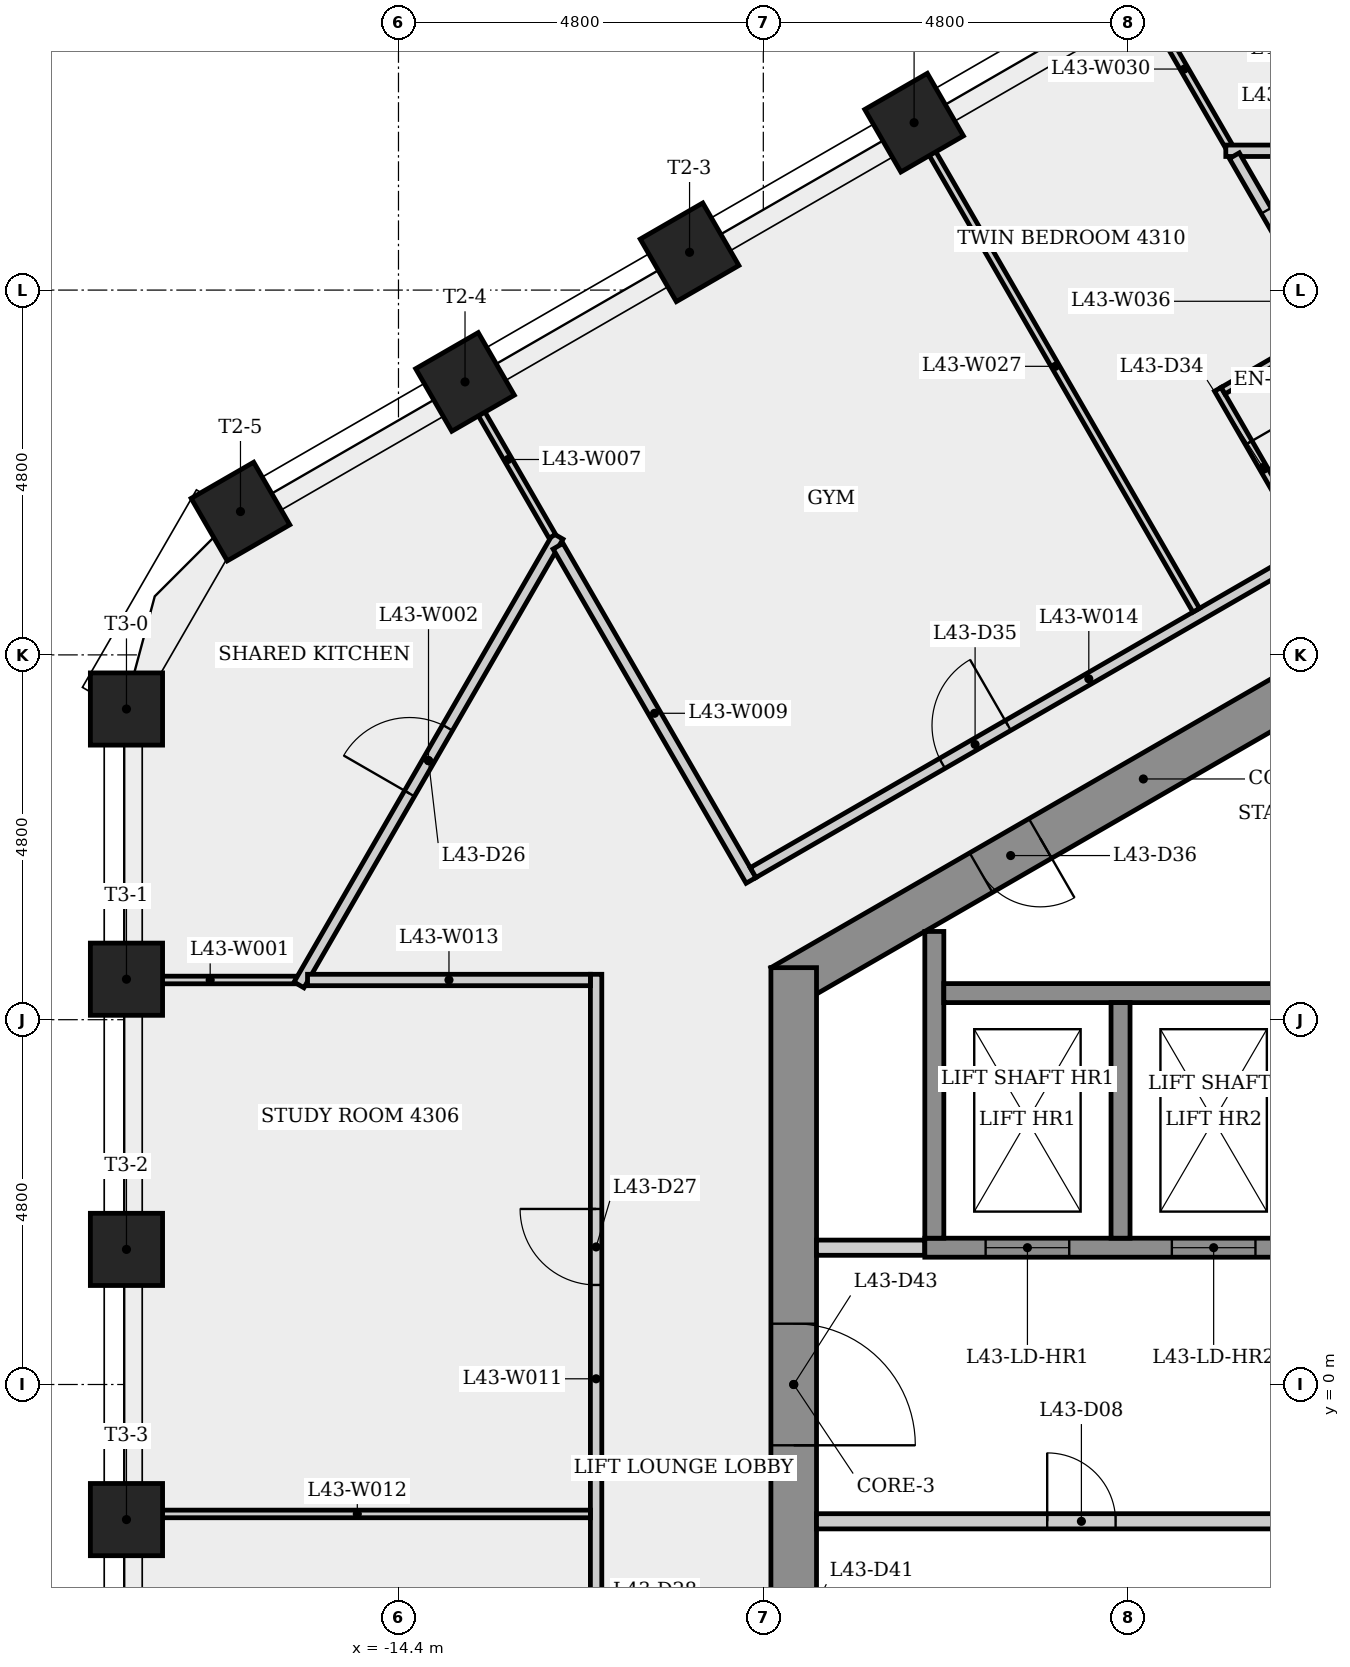
"""IFC4 building model, lengths in metres.
Left out: names, types, materials, properties, quantities, classifications, styles, units other than length and angle.
Written with IfcOpenShell. Run it as: python <this file> out.ifc"""

import sys

from ifc_helpers import new_model, si_unit, direction, frame, frame_2d, origin, origin_2d, place, context, subcontext, project, spatial, rectangle, extrude, element, fill, save


model = new_model("IFC4")
c1 = context("Model", 3, precision=1e-05, world=origin(), true_north=direction((0.0, 1.0)))
c2 = subcontext(c1, "Body", "Model", "MODEL_VIEW")
j1 = project(units=[si_unit("LENGTHUNIT", "METRE"), si_unit("PLANEANGLEUNIT", "RADIAN")], contexts=[c1])
p1 = place(None, origin())
s1 = spatial("IfcSite", under=j1, at=p1, CompositionType="ELEMENT")
p2 = place(p1, origin())
s2 = spatial("IfcBuilding", under=s1, at=p2, CompositionType="ELEMENT")
p3 = place(p2, frame((0.0, 0.0, 162.9)))
s3 = spatial("IfcBuildingStorey", under=s2, at=p3, CompositionType="ELEMENT", Elevation=162.9)
p4 = place(p3, frame((0.15, 10.71, 0.0), z_axis=(0.0, 0.0, 1.0), x_axis=(-0.866023993627, -0.500002442456, 0.0)))
e1 = element("IfcWall", 1, at=p4, inside=s3, PredefinedType="SHEAR", context=c2, shape_type="SweptSolid", body=[
    extrude(rectangle(XDim=10.97, YDim=0.6, at=frame_2d((5.485, 0.0))), origin(), (0.0, 0.0, 1.0), 3.4),
])
p5 = place(p4, frame((7.05, 0.0, 0.0)))
e2 = element("IfcOpeningElement", 2, at=p5, cuts=e1, PredefinedType="OPENING", context=c2, shape_type="SweptSolid", body=[
    extrude(rectangle(XDim=0.9, YDim=2.1, at=frame_2d((0.45, 1.05))), frame((0.0, 0.31, 0.0), z_axis=(0.0, -1.0, 0.0), x_axis=(1.0, 0.0, 0.0)), (0.0, 0.0, 1.0), 0.62),
])
p6 = place(p3, frame((-9.2, 5.485, 0.0), z_axis=(0.0, 0.0, 1.0), x_axis=(0.0, -1.0, 0.0)))
e3 = element("IfcWall", 3, at=p6, inside=s3, PredefinedType="SHEAR", context=c2, shape_type="SweptSolid", body=[
    extrude(rectangle(XDim=10.97, YDim=0.6, at=frame_2d((5.485, 0.0))), origin(), (0.0, 0.0, 1.0), 3.4),
])
p7 = place(p6, frame((8.516, 0.0, 0.0)))
e4 = element("IfcOpeningElement", 4, at=p7, cuts=e3, PredefinedType="OPENING", context=c2, shape_type="SweptSolid", body=[
    extrude(rectangle(XDim=0.9, YDim=2.1, at=frame_2d((0.45, 1.05))), frame((0.0, 0.31, 0.0), z_axis=(0.0, -1.0, 0.0), x_axis=(1.0, 0.0, 0.0)), (0.0, 0.0, 1.0), 0.62),
])
p8 = place(p6, frame((4.685, 0.0, 0.0)))
e5 = element("IfcOpeningElement", 5, at=p8, cuts=e3, PredefinedType="OPENING", context=c2, shape_type="SweptSolid", body=[
    extrude(rectangle(XDim=1.6, YDim=2.1, at=frame_2d((0.8, 1.05))), frame((0.0, 0.31, 0.0), z_axis=(0.0, -1.0, 0.0), x_axis=(1.0, 0.0, 0.0)), (0.0, 0.0, 1.0), 0.62),
])
for number, where, z_axis, x_axis in (
    (6, (-7.616, 16.603, 0.0), (0.0, 0.0, 1.0), (-0.5, 0.866, 0.0)),
    (7, (-10.57, 14.897, 0.0), (0.0, 0.0, 1.0), (-0.5, 0.866, 0.0)),
    (8, (-13.525, 13.192, 0.0), (0.0, 0.0, 1.0), (-0.5, 0.866, 0.0)),
    (9, (-16.479, 11.486, 0.0), (0.0, 0.0, 1.0), (-0.5, 0.866, 0.0)),
    (10, (-17.979, 8.888, 0.0), (0.0, 0.0, 1.0), (-1.0, 0.0, 0.0)),
    (11, (-17.979, 5.333, 0.0), (0.0, 0.0, 1.0), (-1.0, 0.0, 0.0)),
    (12, (-17.979, 1.778, 0.0), (0.0, 0.0, 1.0), (-1.0, 0.0, 0.0)),
    (13, (-17.979, -1.778, 0.0), (0.0, 0.0, 1.0), (-1.0, 0.0, 0.0)),
):
    element("IfcColumn", number, at=place(p3, frame(where, z_axis=z_axis, x_axis=x_axis)), inside=s3, PredefinedType="COLUMN", context=c2, shape_type="SweptSolid", body=[
        extrude(rectangle(XDim=0.95, YDim=0.95, at=origin_2d()), origin(), (0.0, 0.0, 1.0), 3.4),
    ])
p9 = place(p3, frame((-15.747, 5.323, 0.0), z_axis=(0.0, 0.0, 1.0), x_axis=(-1.0, 0.0, 0.0)))
e14 = element("IfcWall", 14, at=p9, inside=s3, PredefinedType="PARTITIONING", context=c2, shape_type="SweptSolid", body=[
    extrude(rectangle(XDim=2.262, YDim=0.1, at=frame_2d((1.131, 0.0))), origin(), (0.0, 0.0, 1.0), 3.05),
])
p10 = place(p3, frame((-15.709, 5.258, 0.0), z_axis=(0.0, 0.0, 1.0), x_axis=(0.500006657701, 0.866021559925, 0.0)))
e15 = element("IfcWall", 15, at=p10, inside=s3, PredefinedType="PARTITIONING", context=c2, shape_type="SweptSolid", body=[
    extrude(rectangle(XDim=6.816, YDim=0.15, at=frame_2d((3.408, 0.0))), origin(), (0.0, 0.0, 1.0), 3.05),
])
p11 = place(p10, frame((2.908, 0.0, 0.0)))
e16 = element("IfcOpeningElement", 16, at=p11, cuts=e15, PredefinedType="OPENING", context=c2, shape_type="SweptSolid", body=[
    extrude(rectangle(XDim=1.0, YDim=2.1, at=frame_2d((0.5, 1.05))), frame((0.0, 0.085, 0.0), z_axis=(0.0, -1.0, 0.0), x_axis=(1.0, 0.0, 0.0)), (0.0, 0.0, 1.0), 0.17),
])
p12 = place(p3, frame((-13.542, 13.181, 0.0), z_axis=(0.0, 0.0, 1.0), x_axis=(0.500021330162, -0.86601308846, 0.0)))
e17 = element("IfcWall", 17, at=p12, inside=s3, PredefinedType="PARTITIONING", context=c2, shape_type="SweptSolid", body=[
    extrude(rectangle(XDim=2.333, YDim=0.1, at=frame_2d((1.167, 0.0))), origin(), (0.0, 0.0, 1.0), 3.05),
])
p13 = place(p3, frame((-12.301, 11.031, 0.0), z_axis=(0.0, 0.0, 1.0), x_axis=(0.499986018985, -0.866033475577, 0.0)))
e18 = element("IfcWall", 18, at=p13, inside=s3, PredefinedType="PARTITIONING", context=c2, shape_type="SweptSolid", body=[
    extrude(rectangle(XDim=5.078, YDim=0.15, at=frame_2d((2.539, 0.0))), origin(), (0.0, 0.0, 1.0), 3.05),
])
p14 = place(p3, frame((-11.8, -5.247, 0.0), z_axis=(0.0, 0.0, 1.0), x_axis=(0.0, 1.0, 0.0)))
e19 = element("IfcWall", 19, at=p14, inside=s3, PredefinedType="PARTITIONING", context=c2, shape_type="SweptSolid", body=[
    extrude(rectangle(XDim=10.645, YDim=0.15, at=frame_2d((5.322, 0.0))), origin(), (0.0, 0.0, 1.0), 3.05),
])
p15 = place(p14, frame((6.557, 0.0, 0.0)))
e20 = element("IfcOpeningElement", 20, at=p15, cuts=e19, PredefinedType="OPENING", context=c2, shape_type="SweptSolid", body=[
    extrude(rectangle(XDim=1.0, YDim=2.1, at=frame_2d((0.5, 1.05))), frame((0.0, 0.085, 0.0), z_axis=(0.0, -1.0, 0.0), x_axis=(1.0, 0.0, 0.0)), (0.0, 0.0, 1.0), 0.17),
])
p16 = place(p14, frame((1.257, 0.0, 0.0)))
e21 = element("IfcOpeningElement", 21, at=p16, cuts=e19, PredefinedType="OPENING", context=c2, shape_type="SweptSolid", body=[
    extrude(rectangle(XDim=1.0, YDim=2.1, at=frame_2d((0.5, 1.05))), frame((0.0, 0.085, 0.0), z_axis=(0.0, -1.0, 0.0), x_axis=(1.0, 0.0, 0.0)), (0.0, 0.0, 1.0), 0.17),
])
p17 = place(p3, frame((-11.875, -1.703, 0.0), z_axis=(0.0, 0.0, 1.0), x_axis=(-1.0, 0.0, 0.0)))
e22 = element("IfcWall", 22, at=p17, inside=s3, PredefinedType="PARTITIONING", context=c2, shape_type="SweptSolid", body=[
    extrude(rectangle(XDim=6.134, YDim=0.1, at=frame_2d((3.067, 0.0))), origin(), (0.0, 0.0, 1.0), 3.05),
])
p18 = place(p3, frame((-11.875, 5.323, 0.0), z_axis=(0.0, 0.0, 1.0), x_axis=(-1.0, 0.0, 0.0)))
e23 = element("IfcWall", 23, at=p18, inside=s3, PredefinedType="PARTITIONING", context=c2, shape_type="SweptSolid", body=[
    extrude(rectangle(XDim=3.721, YDim=0.15, at=frame_2d((1.861, 0.0))), origin(), (0.0, 0.0, 1.0), 3.05),
])
p19 = place(p3, frame((-9.734, 6.735, 0.0), z_axis=(0.0, 0.0, 1.0), x_axis=(0.866026544813, 0.499998023675, 0.0)))
e24 = element("IfcWall", 24, at=p19, inside=s3, PredefinedType="PARTITIONING", context=c2, shape_type="SweptSolid", body=[
    extrude(rectangle(XDim=10.2, YDim=0.15, at=frame_2d((5.1, 0.0))), origin(), (0.0, 0.0, 1.0), 3.05),
])
p20 = place(p19, frame((2.872, 0.0, 0.0)))
e25 = element("IfcOpeningElement", 25, at=p20, cuts=e24, PredefinedType="OPENING", context=c2, shape_type="SweptSolid", body=[
    extrude(rectangle(XDim=1.0, YDim=2.1, at=frame_2d((0.5, 1.05))), frame((0.0, 0.085, 0.0), z_axis=(0.0, -1.0, 0.0), x_axis=(1.0, 0.0, 0.0)), (0.0, 0.0, 1.0), 0.17),
])
p21 = place(p3, frame((-8.9, 1.8, 0.0), z_axis=(0.0, 0.0, 1.0), x_axis=(1.0, 0.0, 0.0)))
e26 = element("IfcWall", 26, at=p21, inside=s3, PredefinedType="PARTITIONING", context=c2, shape_type="SweptSolid", body=[
    extrude(rectangle(XDim=1.425, YDim=0.2, at=frame_2d((0.712, 0.0))), origin(), (0.0, 0.0, 1.0), 3.05),
])
p22 = place(p3, frame((-7.475, 1.8, 0.0), z_axis=(0.0, 0.0, 1.0), x_axis=(1.0, 0.0, 0.0)))
e27 = element("IfcWall", 27, at=p22, inside=s3, PredefinedType="SHEAR", context=c2, shape_type="SweptSolid", body=[
    extrude(rectangle(XDim=14.95, YDim=0.25, at=frame_2d((7.475, 0.0))), origin(), (0.0, 0.0, 1.0), 3.05),
])
p23 = place(p22, frame((0.8, 0.0, 0.0)))
e28 = element("IfcOpeningElement", 28, at=p23, cuts=e27, PredefinedType="OPENING", context=c2, shape_type="SweptSolid", body=[
    extrude(rectangle(XDim=1.1, YDim=2.1, at=frame_2d((0.55, 1.05))), frame((0.0, 0.135, 0.0), z_axis=(0.0, -1.0, 0.0), x_axis=(1.0, 0.0, 0.0)), (0.0, 0.0, 1.0), 0.27),
])
p24 = place(p22, frame((3.25, 0.0, 0.0)))
e29 = element("IfcOpeningElement", 29, at=p24, cuts=e27, PredefinedType="OPENING", context=c2, shape_type="SweptSolid", body=[
    extrude(rectangle(XDim=1.1, YDim=2.1, at=frame_2d((0.55, 1.05))), frame((0.0, 0.135, 0.0), z_axis=(0.0, -1.0, 0.0), x_axis=(1.0, 0.0, 0.0)), (0.0, 0.0, 1.0), 0.27),
])
p25 = place(p22, frame((5.7, 0.0, 0.0)))
e30 = element("IfcOpeningElement", 30, at=p25, cuts=e27, PredefinedType="OPENING", context=c2, shape_type="SweptSolid", body=[
    extrude(rectangle(XDim=1.1, YDim=2.1, at=frame_2d((0.55, 1.05))), frame((0.0, 0.135, 0.0), z_axis=(0.0, -1.0, 0.0), x_axis=(1.0, 0.0, 0.0)), (0.0, 0.0, 1.0), 0.27),
])
p26 = place(p22, frame((8.15, 0.0, 0.0)))
e31 = element("IfcOpeningElement", 31, at=p26, cuts=e27, PredefinedType="OPENING", context=c2, shape_type="SweptSolid", body=[
    extrude(rectangle(XDim=1.1, YDim=2.1, at=frame_2d((0.55, 1.05))), frame((0.0, 0.135, 0.0), z_axis=(0.0, -1.0, 0.0), x_axis=(1.0, 0.0, 0.0)), (0.0, 0.0, 1.0), 0.27),
])
p27 = place(p22, frame((10.6, 0.0, 0.0)))
e32 = element("IfcOpeningElement", 32, at=p27, cuts=e27, PredefinedType="OPENING", context=c2, shape_type="SweptSolid", body=[
    extrude(rectangle(XDim=1.1, YDim=2.1, at=frame_2d((0.55, 1.05))), frame((0.0, 0.135, 0.0), z_axis=(0.0, -1.0, 0.0), x_axis=(1.0, 0.0, 0.0)), (0.0, 0.0, 1.0), 0.27),
])
p28 = place(p22, frame((13.05, 0.0, 0.0)))
e33 = element("IfcOpeningElement", 33, at=p28, cuts=e27, PredefinedType="OPENING", context=c2, shape_type="SweptSolid", body=[
    extrude(rectangle(XDim=1.1, YDim=2.1, at=frame_2d((0.55, 1.05))), frame((0.0, 0.135, 0.0), z_axis=(0.0, -1.0, 0.0), x_axis=(1.0, 0.0, 0.0)), (0.0, 0.0, 1.0), 0.27),
])
p29 = place(p3, frame((-7.35, 1.925, 0.0), z_axis=(0.0, 0.0, 1.0), x_axis=(0.0, 1.0, 0.0)))
e34 = element("IfcWall", 34, at=p29, inside=s3, PredefinedType="SHEAR", context=c2, shape_type="SweptSolid", body=[
    extrude(rectangle(XDim=4.036, YDim=0.25, at=frame_2d((2.018, 0.0))), origin(), (0.0, 0.0, 1.0), 3.05),
])
p30 = place(p3, frame((-7.225, 5.15, 0.0), z_axis=(0.0, 0.0, 1.0), x_axis=(1.0, 0.0, 0.0)))
e35 = element("IfcWall", 35, at=p30, inside=s3, PredefinedType="SHEAR", context=c2, shape_type="SweptSolid", body=[
    extrude(rectangle(XDim=14.7, YDim=0.25, at=frame_2d((7.35, 0.0))), origin(), (0.0, 0.0, 1.0), 3.05),
])
p31 = place(p3, frame((-4.9, 5.025, 0.0), z_axis=(0.0, 0.0, 1.0), x_axis=(0.0, -1.0, 0.0)))
e36 = element("IfcWall", 36, at=p31, inside=s3, PredefinedType="SHEAR", context=c2, shape_type="SweptSolid", body=[
    extrude(rectangle(XDim=3.1, YDim=0.25, at=frame_2d((1.55, 0.0))), origin(), (0.0, 0.0, 1.0), 3.4),
])
p32 = place(p3, frame((-3.905, 10.188, 0.0), z_axis=(0.0, 0.0, 1.0), x_axis=(-0.499986693774, 0.866033086001, 0.0)))
e37 = element("IfcWall", 37, at=p32, inside=s3, PredefinedType="PARTITIONING", context=c2, shape_type="SweptSolid", body=[
    extrude(rectangle(XDim=7.411, YDim=0.1, at=frame_2d((3.706, 0.0))), origin(), (0.0, 0.0, 1.0), 3.05),
])
p33 = place(p3, frame((-3.62, 13.094, 0.0), z_axis=(0.0, 0.0, 1.0), x_axis=(0.499986429846, -0.866033238375, 0.0)))
e38 = element("IfcWall", 38, at=p33, inside=s3, PredefinedType="PARTITIONING", context=c2, shape_type="SweptSolid", body=[
    extrude(rectangle(XDim=2.375, YDim=0.1, at=frame_2d((1.188, 0.0))), origin(), (0.0, 0.0, 1.0), 3.05),
])
p34 = place(p33, frame((0.812, 0.0, 0.0)))
e39 = element("IfcOpeningElement", 39, at=p34, cuts=e38, PredefinedType="OPENING", context=c2, shape_type="SweptSolid", body=[
    extrude(rectangle(XDim=0.8, YDim=2.1, at=frame_2d((0.4, 1.05))), frame((0.0, 0.06, 0.0), z_axis=(0.0, -1.0, 0.0), x_axis=(1.0, 0.0, 0.0)), (0.0, 0.0, 1.0), 0.12),
])
p35 = place(p3, frame((-3.478, 16.298, 0.0), z_axis=(0.0, 0.0, 1.0), x_axis=(-0.499988162555, 0.866032238029, 0.0)))
e40 = element("IfcWall", 40, at=p35, inside=s3, PredefinedType="PARTITIONING", context=c2, shape_type="SweptSolid", body=[
    extrude(rectangle(XDim=2.333, YDim=0.1, at=frame_2d((1.167, 0.0))), origin(), (0.0, 0.0, 1.0), 3.05),
])
p36 = place(p3, frame((-3.515, 16.233, 0.0), z_axis=(0.0, 0.0, 1.0), x_axis=(1.0, 0.0, 0.0)))
e41 = element("IfcWall", 41, at=p36, inside=s3, PredefinedType="PARTITIONING", context=c2, shape_type="SweptSolid", body=[
    extrude(rectangle(XDim=4.648, YDim=0.15, at=frame_2d((2.324, 0.0))), origin(), (0.0, 0.0, 1.0), 3.05),
])
p37 = place(p36, frame((1.842, 0.0, 0.0)))
e42 = element("IfcOpeningElement", 42, at=p37, cuts=e41, PredefinedType="OPENING", context=c2, shape_type="SweptSolid", body=[
    extrude(rectangle(XDim=1.0, YDim=2.1, at=frame_2d((0.5, 1.05))), frame((0.0, 0.085, 0.0), z_axis=(0.0, -1.0, 0.0), x_axis=(1.0, 0.0, 0.0)), (0.0, 0.0, 1.0), 0.17),
])
p38 = place(p3, frame((-2.166, 13.876, 0.0), z_axis=(0.0, 0.0, 1.0), x_axis=(-0.866028054938, -0.499995408039, 0.0)))
e43 = element("IfcWall", 43, at=p38, inside=s3, PredefinedType="PARTITIONING", context=c2, shape_type="SweptSolid", body=[
    extrude(rectangle(XDim=1.6, YDim=0.1, at=frame_2d((0.8, 0.0))), origin(), (0.0, 0.0, 1.0), 3.05),
])
p39 = place(p3, frame((-3.403, 16.168, 0.0), z_axis=(0.0, 0.0, 1.0), x_axis=(0.499991593815, -0.866030257043, 0.0)))
e44 = element("IfcWall", 44, at=p39, inside=s3, PredefinedType="PARTITIONING", context=c2, shape_type="SweptSolid", body=[
    extrude(rectangle(XDim=4.423, YDim=0.15, at=frame_2d((2.212, 0.0))), origin(), (0.0, 0.0, 1.0), 3.05),
])
p40 = place(p39, frame((0.837, 0.0, 0.0)))
e45 = element("IfcOpeningElement", 45, at=p40, cuts=e44, PredefinedType="OPENING", context=c2, shape_type="SweptSolid", body=[
    extrude(rectangle(XDim=0.9, YDim=2.1, at=frame_2d((0.45, 1.05))), frame((0.0, 0.085, 0.0), z_axis=(0.0, -1.0, 0.0), x_axis=(1.0, 0.0, 0.0)), (0.0, 0.0, 1.0), 0.17),
])
p41 = place(p3, frame((-8.9, -1.8, 0.0), z_axis=(0.0, 0.0, 1.0), x_axis=(1.0, 0.0, 0.0)))
e46 = element("IfcWall", 46, at=p41, inside=s3, PredefinedType="PARTITIONING", context=c2, shape_type="SweptSolid", body=[
    extrude(rectangle(XDim=11.225, YDim=0.2, at=frame_2d((5.613, 0.0))), origin(), (0.0, 0.0, 1.0), 3.05),
])
p42 = place(p41, frame((3.035, 0.0, 0.0)))
e47 = element("IfcOpeningElement", 47, at=p42, cuts=e46, PredefinedType="OPENING", context=c2, shape_type="SweptSolid", body=[
    extrude(rectangle(XDim=0.9, YDim=2.1, at=frame_2d((0.45, 1.05))), frame((0.0, 0.11, 0.0), z_axis=(0.0, -1.0, 0.0), x_axis=(1.0, 0.0, 0.0)), (0.0, 0.0, 1.0), 0.22),
])
p43 = place(p41, frame((9.613, 0.0, 0.0)))
e48 = element("IfcOpeningElement", 48, at=p43, cuts=e46, PredefinedType="OPENING", context=c2, shape_type="SweptSolid", body=[
    extrude(rectangle(XDim=0.9, YDim=2.1, at=frame_2d((0.45, 1.05))), frame((0.0, 0.11, 0.0), z_axis=(0.0, -1.0, 0.0), x_axis=(1.0, 0.0, 0.0)), (0.0, 0.0, 1.0), 0.22),
])
p44 = place(p23, origin())
e49 = element("IfcDoor", 49, at=p44, inside=s3, OperationType="SLIDING_TO_LEFT", PredefinedType="DOOR", context=c2, shape_type="SweptSolid", body=[
    extrude(rectangle(XDim=1.1, YDim=2.1, at=frame_2d((0.55, 1.05))), frame((0.0, 0.025, 0.0), z_axis=(0.0, -1.0, 0.0), x_axis=(1.0, 0.0, 0.0)), (0.0, 0.0, 1.0), 0.05),
])
fill(e28, e49)
p45 = place(p24, origin())
e50 = element("IfcDoor", 50, at=p45, inside=s3, OperationType="SLIDING_TO_LEFT", PredefinedType="DOOR", context=c2, shape_type="SweptSolid", body=[
    extrude(rectangle(XDim=1.1, YDim=2.1, at=frame_2d((0.55, 1.05))), frame((0.0, 0.025, 0.0), z_axis=(0.0, -1.0, 0.0), x_axis=(1.0, 0.0, 0.0)), (0.0, 0.0, 1.0), 0.05),
])
fill(e29, e50)
p46 = place(p42, origin())
e51 = element("IfcDoor", 51, at=p46, inside=s3, OperationType="SINGLE_SWING_LEFT", PredefinedType="DOOR", context=c2, shape_type="SweptSolid", body=[
    extrude(rectangle(XDim=0.9, YDim=2.1, at=frame_2d((0.45, 1.05))), frame((0.0, 0.025, 0.0), z_axis=(0.0, -1.0, 0.0), x_axis=(1.0, 0.0, 0.0)), (0.0, 0.0, 1.0), 0.05),
])
fill(e47, e51)
p47 = place(p11, origin())
e52 = element("IfcDoor", 52, at=p47, inside=s3, OperationType="SINGLE_SWING_LEFT", PredefinedType="DOOR", context=c2, shape_type="SweptSolid", body=[
    extrude(rectangle(XDim=1.0, YDim=2.1, at=frame_2d((0.5, 1.05))), frame((0.0, 0.025, 0.0), z_axis=(0.0, -1.0, 0.0), x_axis=(1.0, 0.0, 0.0)), (0.0, 0.0, 1.0), 0.05),
])
fill(e16, e52)
p48 = place(p15, origin())
e53 = element("IfcDoor", 53, at=p48, inside=s3, OperationType="SINGLE_SWING_RIGHT", PredefinedType="DOOR", context=c2, shape_type="SweptSolid", body=[
    extrude(rectangle(XDim=1.0, YDim=2.1, at=frame_2d((0.5, 1.05))), frame((0.0, 0.025, 0.0), z_axis=(0.0, -1.0, 0.0), x_axis=(1.0, 0.0, 0.0)), (0.0, 0.0, 1.0), 0.05),
])
fill(e20, e53)
p49 = place(p40, origin())
e54 = element("IfcDoor", 54, at=p49, inside=s3, OperationType="SINGLE_SWING_RIGHT", PredefinedType="DOOR", context=c2, shape_type="SweptSolid", body=[
    extrude(rectangle(XDim=0.9, YDim=2.1, at=frame_2d((0.45, 1.05))), frame((0.0, 0.025, 0.0), z_axis=(0.0, -1.0, 0.0), x_axis=(1.0, 0.0, 0.0)), (0.0, 0.0, 1.0), 0.05),
])
fill(e45, e54)
p50 = place(p34, origin())
e55 = element("IfcDoor", 55, at=p50, inside=s3, OperationType="SINGLE_SWING_LEFT", PredefinedType="DOOR", context=c2, shape_type="SweptSolid", body=[
    extrude(rectangle(XDim=0.8, YDim=2.1, at=frame_2d((0.4, 1.05))), frame((0.0, 0.025, 0.0), z_axis=(0.0, -1.0, 0.0), x_axis=(1.0, 0.0, 0.0)), (0.0, 0.0, 1.0), 0.05),
])
fill(e39, e55)
p51 = place(p20, origin())
e56 = element("IfcDoor", 56, at=p51, inside=s3, OperationType="SINGLE_SWING_RIGHT", PredefinedType="DOOR", context=c2, shape_type="SweptSolid", body=[
    extrude(rectangle(XDim=1.0, YDim=2.1, at=frame_2d((0.5, 1.05))), frame((0.0, 0.025, 0.0), z_axis=(0.0, -1.0, 0.0), x_axis=(1.0, 0.0, 0.0)), (0.0, 0.0, 1.0), 0.05),
])
fill(e25, e56)
p52 = place(p5, origin())
e57 = element("IfcDoor", 57, at=p52, inside=s3, OperationType="SINGLE_SWING_LEFT", PredefinedType="DOOR", context=c2, shape_type="SweptSolid", body=[
    extrude(rectangle(XDim=0.9, YDim=2.1, at=frame_2d((0.45, 1.05))), frame((0.0, 0.025, 0.0), z_axis=(0.0, -1.0, 0.0), x_axis=(1.0, 0.0, 0.0)), (0.0, 0.0, 1.0), 0.05),
])
fill(e2, e57)
p53 = place(p8, origin())
e58 = element("IfcDoor", 58, at=p53, inside=s3, OperationType="SINGLE_SWING_RIGHT", PredefinedType="DOOR", context=c2, shape_type="SweptSolid", body=[
    extrude(rectangle(XDim=1.6, YDim=2.1, at=frame_2d((0.8, 1.05))), frame((0.0, 0.025, 0.0), z_axis=(0.0, -1.0, 0.0), x_axis=(1.0, 0.0, 0.0)), (0.0, 0.0, 1.0), 0.05),
])
fill(e5, e58)
save(model, sys.argv[1])
